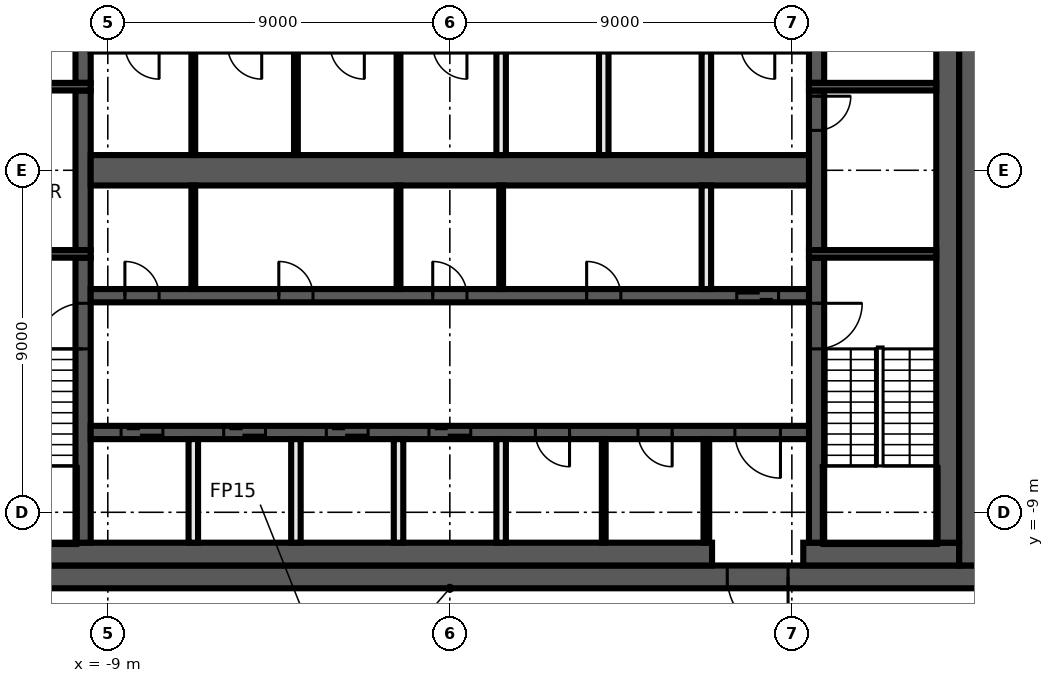
"""IFC4 building model, lengths in metres.
Left out: names, types, materials, properties, quantities, classifications, styles, units other than length and angle.
Written with IfcOpenShell. Run it as: python <this file> out.ifc"""

import sys

from ifc_helpers import new_model, si_unit, direction, frame, frame_2d, origin, place, context, subcontext, project, spatial, rectangle, extrude, element, fill, save


model = new_model("IFC4")
c1 = context("Model", 3, precision=1e-05, world=origin(), true_north=direction((0.0, 1.0)))
c2 = subcontext(c1, "Body", "Model", "MODEL_VIEW")
j1 = project(units=[si_unit("LENGTHUNIT", "METRE"), si_unit("PLANEANGLEUNIT", "RADIAN")], contexts=[c1])
p1 = place(None, origin())
s1 = spatial("IfcSite", under=j1, at=p1, CompositionType="ELEMENT")
p2 = place(p1, origin())
s2 = spatial("IfcBuilding", under=s1, at=p2, CompositionType="ELEMENT")
p3 = place(p2, frame((0.0, 0.0, 336.2)))
s3 = spatial("IfcBuildingStorey", under=s2, at=p3, CompositionType="ELEMENT", Elevation=336.2)
p4 = place(p3, frame((14.0, -10.7, 0.0), z_axis=(0.0, 0.0, 1.0), x_axis=(-1.0, 0.0, 0.0)))
e1 = element("IfcWall", 1, at=p4, inside=s3, PredefinedType="SHEAR", context=c2, shape_type="SweptSolid", body=[
    extrude(rectangle(XDim=28.0, YDim=0.6, at=frame_2d((14.0, 0.0))), origin(), (0.0, 0.0, 1.0), 3.82),
])
p5 = place(p4, frame((5.1, 0.0, 0.0)))
e2 = element("IfcOpeningElement", 2, at=p5, cuts=e1, PredefinedType="OPENING", context=c2, shape_type="SweptSolid", body=[
    extrude(rectangle(XDim=1.6, YDim=2.1, at=frame_2d((0.8, 1.05))), frame((0.0, 0.31, 0.0), z_axis=(0.0, -1.0, 0.0), x_axis=(1.0, 0.0, 0.0)), (0.0, 0.0, 1.0), 0.62),
])
p6 = place(p3, frame((13.7, 10.4, 0.0), z_axis=(0.0, 0.0, 1.0), x_axis=(0.0, -1.0, 0.0)))
e3 = element("IfcWall", 3, at=p6, inside=s3, PredefinedType="SHEAR", context=c2, shape_type="SweptSolid", body=[
    extrude(rectangle(XDim=20.8, YDim=0.6, at=frame_2d((10.4, 0.0))), origin(), (0.0, 0.0, 1.0), 3.82),
])
p7 = place(p3, frame((13.4, -10.1, 0.0), z_axis=(0.0, 0.0, 1.0), x_axis=(-1.0, 0.0, 0.0)))
e4 = element("IfcWall", 4, at=p7, inside=s3, PredefinedType="SHEAR", context=c2, shape_type="SweptSolid", body=[
    extrude(rectangle(XDim=4.1, YDim=0.6, at=frame_2d((2.05, 0.0))), origin(), (0.0, 0.0, 1.0), 3.82),
])
p8 = place(p3, frame((6.9, -10.1, 0.0), z_axis=(0.0, 0.0, 1.0), x_axis=(-1.0, 0.0, 0.0)))
e5 = element("IfcWall", 5, at=p8, inside=s3, PredefinedType="SHEAR", context=c2, shape_type="SweptSolid", body=[
    extrude(rectangle(XDim=20.3, YDim=0.6, at=frame_2d((10.15, 0.0))), origin(), (0.0, 0.0, 1.0), 3.82),
])
p9 = place(p3, frame((13.1, 9.8, 0.0), z_axis=(0.0, 0.0, 1.0), x_axis=(0.0, -1.0, 0.0)))
e6 = element("IfcWall", 6, at=p9, inside=s3, PredefinedType="SHEAR", context=c2, shape_type="SweptSolid", body=[
    extrude(rectangle(XDim=19.6, YDim=0.6, at=frame_2d((9.8, 0.0))), origin(), (0.0, 0.0, 1.0), 3.82),
])
p10 = place(p3, frame((9.65, -2.3, 0.0), z_axis=(0.0, 0.0, 1.0), x_axis=(0.0, -1.0, 0.0)))
e7 = element("IfcWall", 7, at=p10, inside=s3, PredefinedType="SHEAR", context=c2, shape_type="SweptSolid", body=[
    extrude(rectangle(XDim=7.5, YDim=0.4, at=frame_2d((3.75, 0.0))), origin(), (0.0, 0.0, 1.0), 3.82),
])
p11 = place(p10, frame((1.2, 0.0, 0.0)))
e8 = element("IfcOpeningElement", 8, at=p11, cuts=e7, PredefinedType="OPENING", context=c2, shape_type="SweptSolid", body=[
    extrude(rectangle(XDim=1.2, YDim=2.1, at=frame_2d((0.6, 1.05))), frame((0.0, 0.21, 0.0), z_axis=(0.0, -1.0, 0.0), x_axis=(1.0, 0.0, 0.0)), (0.0, 0.0, 1.0), 0.42),
])
p12 = place(p3, frame((9.65, 2.1, 0.0), z_axis=(0.0, 0.0, 1.0), x_axis=(0.0, -1.0, 0.0)))
e9 = element("IfcWall", 9, at=p12, inside=s3, PredefinedType="SHEAR", context=c2, shape_type="SweptSolid", body=[
    extrude(rectangle(XDim=4.2, YDim=0.4, at=frame_2d((2.1, 0.0))), origin(), (0.0, 0.0, 1.0), 3.82),
])
p13 = place(p12, frame((0.15, 0.0, 0.0)))
e10 = element("IfcOpeningElement", 10, at=p13, cuts=e9, PredefinedType="OPENING", context=c2, shape_type="SweptSolid", body=[
    extrude(rectangle(XDim=0.9, YDim=2.1, at=frame_2d((0.45, 1.05))), frame((0.0, 0.21, 0.0), z_axis=(0.0, -1.0, 0.0), x_axis=(1.0, 0.0, 0.0)), (0.0, 0.0, 1.0), 0.42),
])
p14 = place(p3, frame((9.65, 9.8, 0.0), z_axis=(0.0, 0.0, 1.0), x_axis=(0.0, -1.0, 0.0)))
e11 = element("IfcWall", 11, at=p14, inside=s3, PredefinedType="SHEAR", context=c2, shape_type="SweptSolid", body=[
    extrude(rectangle(XDim=7.5, YDim=0.4, at=frame_2d((3.75, 0.0))), origin(), (0.0, 0.0, 1.0), 3.82),
])
p15 = place(p14, frame((5.1, 0.0, 0.0)))
e12 = element("IfcOpeningElement", 12, at=p15, cuts=e11, PredefinedType="OPENING", context=c2, shape_type="SweptSolid", body=[
    extrude(rectangle(XDim=1.2, YDim=2.1, at=frame_2d((0.6, 1.05))), frame((0.0, 0.21, 0.0), z_axis=(0.0, -1.0, 0.0), x_axis=(1.0, 0.0, 0.0)), (0.0, 0.0, 1.0), 0.42),
])
p16 = place(p3, frame((-9.65, -9.8, 0.0), z_axis=(0.0, 0.0, 1.0), x_axis=(0.0, 1.0, 0.0)))
e13 = element("IfcWall", 13, at=p16, inside=s3, PredefinedType="SHEAR", context=c2, shape_type="SweptSolid", body=[
    extrude(rectangle(XDim=7.5, YDim=0.4, at=frame_2d((3.75, 0.0))), origin(), (0.0, 0.0, 1.0), 3.82),
])
p17 = place(p16, frame((5.1, 0.0, 0.0)))
e14 = element("IfcOpeningElement", 14, at=p17, cuts=e13, PredefinedType="OPENING", context=c2, shape_type="SweptSolid", body=[
    extrude(rectangle(XDim=1.2, YDim=2.1, at=frame_2d((0.6, 1.05))), frame((0.0, 0.21, 0.0), z_axis=(0.0, -1.0, 0.0), x_axis=(1.0, 0.0, 0.0)), (0.0, 0.0, 1.0), 0.42),
])
p18 = place(p3, frame((-9.65, -2.1, 0.0), z_axis=(0.0, 0.0, 1.0), x_axis=(0.0, 1.0, 0.0)))
e15 = element("IfcWall", 15, at=p18, inside=s3, PredefinedType="SHEAR", context=c2, shape_type="SweptSolid", body=[
    extrude(rectangle(XDim=4.2, YDim=0.4, at=frame_2d((2.1, 0.0))), origin(), (0.0, 0.0, 1.0), 3.82),
])
p19 = place(p3, frame((-9.65, 2.3, 0.0), z_axis=(0.0, 0.0, 1.0), x_axis=(0.0, 1.0, 0.0)))
e16 = element("IfcWall", 16, at=p19, inside=s3, PredefinedType="SHEAR", context=c2, shape_type="SweptSolid", body=[
    extrude(rectangle(XDim=7.5, YDim=0.4, at=frame_2d((3.75, 0.0))), origin(), (0.0, 0.0, 1.0), 3.82),
])
p20 = place(p19, frame((1.2, 0.0, 0.0)))
e17 = element("IfcOpeningElement", 17, at=p20, cuts=e16, PredefinedType="OPENING", context=c2, shape_type="SweptSolid", body=[
    extrude(rectangle(XDim=1.2, YDim=2.1, at=frame_2d((0.6, 1.05))), frame((0.0, 0.21, 0.0), z_axis=(0.0, -1.0, 0.0), x_axis=(1.0, 0.0, 0.0)), (0.0, 0.0, 1.0), 0.42),
])
for number, where, z_axis, x_axis in (
    (18, (9.45, 2.2, 0.0), (0.0, 0.0, 1.0), (1.0, 0.0, 0.0)),
    (19, (-9.45, 2.2, 0.0), (0.0, 0.0, 1.0), (-1.0, 0.0, 0.0)),
    (20, (9.45, -2.2, 0.0), (0.0, 0.0, 1.0), (1.0, 0.0, 0.0)),
    (21, (-9.45, -2.2, 0.0), (0.0, 0.0, 1.0), (-1.0, 0.0, 0.0)),
):
    element("IfcWall", number, at=place(p3, frame(where, z_axis=z_axis, x_axis=x_axis)), inside=s3, PredefinedType="SHEAR", context=c2, shape_type="SweptSolid", body=[
        extrude(rectangle(XDim=3.35, YDim=0.2, at=frame_2d((1.675, 0.0))), origin(), (0.0, 0.0, 1.0), 3.82),
    ])
p21 = place(p3, frame((-9.45, -3.3, 0.0), z_axis=(0.0, 0.0, 1.0), x_axis=(1.0, 0.0, 0.0)))
e22 = element("IfcWall", 22, at=p21, inside=s3, PredefinedType="SHEAR", context=c2, shape_type="SweptSolid", body=[
    extrude(rectangle(XDim=18.9, YDim=0.35, at=frame_2d((9.45, 0.0))), origin(), (0.0, 0.0, 1.0), 3.82),
])
p22 = place(p21, frame((17.0, 0.0, 0.0)))
e23 = element("IfcOpeningElement", 23, at=p22, cuts=e22, PredefinedType="OPENING", context=c2, shape_type="SweptSolid", body=[
    extrude(rectangle(XDim=1.1, YDim=2.1, at=frame_2d((0.55, 1.05))), frame((0.0, 0.185, 0.0), z_axis=(0.0, -1.0, 0.0), x_axis=(1.0, 0.0, 0.0)), (0.0, 0.0, 1.0), 0.37),
])
p23 = place(p21, frame((0.9, 0.0, 0.0)))
e24 = element("IfcOpeningElement", 24, at=p23, cuts=e22, PredefinedType="OPENING", context=c2, shape_type="SweptSolid", body=[
    extrude(rectangle(XDim=0.9, YDim=2.1, at=frame_2d((0.45, 1.05))), frame((0.0, 0.185, 0.0), z_axis=(0.0, -1.0, 0.0), x_axis=(1.0, 0.0, 0.0)), (0.0, 0.0, 1.0), 0.37),
])
p24 = place(p21, frame((4.95, 0.0, 0.0)))
e25 = element("IfcOpeningElement", 25, at=p24, cuts=e22, PredefinedType="OPENING", context=c2, shape_type="SweptSolid", body=[
    extrude(rectangle(XDim=0.9, YDim=2.1, at=frame_2d((0.45, 1.05))), frame((0.0, 0.185, 0.0), z_axis=(0.0, -1.0, 0.0), x_axis=(1.0, 0.0, 0.0)), (0.0, 0.0, 1.0), 0.37),
])
p25 = place(p21, frame((9.0, 0.0, 0.0)))
e26 = element("IfcOpeningElement", 26, at=p25, cuts=e22, PredefinedType="OPENING", context=c2, shape_type="SweptSolid", body=[
    extrude(rectangle(XDim=0.9, YDim=2.1, at=frame_2d((0.45, 1.05))), frame((0.0, 0.185, 0.0), z_axis=(0.0, -1.0, 0.0), x_axis=(1.0, 0.0, 0.0)), (0.0, 0.0, 1.0), 0.37),
])
p26 = place(p21, frame((13.05, 0.0, 0.0)))
e27 = element("IfcOpeningElement", 27, at=p26, cuts=e22, PredefinedType="OPENING", context=c2, shape_type="SweptSolid", body=[
    extrude(rectangle(XDim=0.9, YDim=2.1, at=frame_2d((0.45, 1.05))), frame((0.0, 0.185, 0.0), z_axis=(0.0, -1.0, 0.0), x_axis=(1.0, 0.0, 0.0)), (0.0, 0.0, 1.0), 0.37),
])
p27 = place(p3, frame((9.45, -6.9, 0.0), z_axis=(0.0, 0.0, 1.0), x_axis=(-1.0, 0.0, 0.0)))
e28 = element("IfcWall", 28, at=p27, inside=s3, PredefinedType="SHEAR", context=c2, shape_type="SweptSolid", body=[
    extrude(rectangle(XDim=18.9, YDim=0.35, at=frame_2d((9.45, 0.0))), origin(), (0.0, 0.0, 1.0), 3.82),
])
p28 = place(p27, frame((17.0, 0.0, 0.0)))
e29 = element("IfcOpeningElement", 29, at=p28, cuts=e28, PredefinedType="OPENING", context=c2, shape_type="SweptSolid", body=[
    extrude(rectangle(XDim=1.1, YDim=2.1, at=frame_2d((0.55, 1.05))), frame((0.0, 0.185, 0.0), z_axis=(0.0, -1.0, 0.0), x_axis=(1.0, 0.0, 0.0)), (0.0, 0.0, 1.0), 0.37),
])
p29 = place(p27, frame((14.3, 0.0, 0.0)))
e30 = element("IfcOpeningElement", 30, at=p29, cuts=e28, PredefinedType="OPENING", context=c2, shape_type="SweptSolid", body=[
    extrude(rectangle(XDim=1.1, YDim=2.1, at=frame_2d((0.55, 1.05))), frame((0.0, 0.185, 0.0), z_axis=(0.0, -1.0, 0.0), x_axis=(1.0, 0.0, 0.0)), (0.0, 0.0, 1.0), 0.37),
])
p30 = place(p27, frame((11.6, 0.0, 0.0)))
e31 = element("IfcOpeningElement", 31, at=p30, cuts=e28, PredefinedType="OPENING", context=c2, shape_type="SweptSolid", body=[
    extrude(rectangle(XDim=1.1, YDim=2.1, at=frame_2d((0.55, 1.05))), frame((0.0, 0.185, 0.0), z_axis=(0.0, -1.0, 0.0), x_axis=(1.0, 0.0, 0.0)), (0.0, 0.0, 1.0), 0.37),
])
p31 = place(p27, frame((8.9, 0.0, 0.0)))
e32 = element("IfcOpeningElement", 32, at=p31, cuts=e28, PredefinedType="OPENING", context=c2, shape_type="SweptSolid", body=[
    extrude(rectangle(XDim=1.1, YDim=2.1, at=frame_2d((0.55, 1.05))), frame((0.0, 0.185, 0.0), z_axis=(0.0, -1.0, 0.0), x_axis=(1.0, 0.0, 0.0)), (0.0, 0.0, 1.0), 0.37),
])
p32 = place(p27, frame((0.75, 0.0, 0.0)))
e33 = element("IfcOpeningElement", 33, at=p32, cuts=e28, PredefinedType="OPENING", context=c2, shape_type="SweptSolid", body=[
    extrude(rectangle(XDim=1.2, YDim=2.1, at=frame_2d((0.6, 1.05))), frame((0.0, 0.185, 0.0), z_axis=(0.0, -1.0, 0.0), x_axis=(1.0, 0.0, 0.0)), (0.0, 0.0, 1.0), 0.37),
])
p33 = place(p27, frame((6.3, 0.0, 0.0)))
e34 = element("IfcOpeningElement", 34, at=p33, cuts=e28, PredefinedType="OPENING", context=c2, shape_type="SweptSolid", body=[
    extrude(rectangle(XDim=0.9, YDim=2.1, at=frame_2d((0.45, 1.05))), frame((0.0, 0.185, 0.0), z_axis=(0.0, -1.0, 0.0), x_axis=(1.0, 0.0, 0.0)), (0.0, 0.0, 1.0), 0.37),
])
p34 = place(p27, frame((3.6, 0.0, 0.0)))
e35 = element("IfcOpeningElement", 35, at=p34, cuts=e28, PredefinedType="OPENING", context=c2, shape_type="SweptSolid", body=[
    extrude(rectangle(XDim=0.9, YDim=2.1, at=frame_2d((0.45, 1.05))), frame((0.0, 0.185, 0.0), z_axis=(0.0, -1.0, 0.0), x_axis=(1.0, 0.0, 0.0)), (0.0, 0.0, 1.0), 0.37),
])
p35 = place(p3, frame((-9.45, 0.0, 0.0), z_axis=(0.0, 0.0, 1.0), x_axis=(1.0, 0.0, 0.0)))
e36 = element("IfcWall", 36, at=p35, inside=s3, PredefinedType="SHEAR", context=c2, shape_type="SweptSolid", body=[
    extrude(rectangle(XDim=18.9, YDim=0.8, at=frame_2d((9.45, 0.0))), origin(), (0.0, 0.0, 1.0), 3.82),
])
p36 = place(p3, frame((6.75, -9.8, 0.0), z_axis=(0.0, 0.0, 1.0), x_axis=(0.0, 1.0, 0.0)))
e37 = element("IfcWall", 37, at=p36, inside=s3, PredefinedType="PARTITIONING", context=c2, shape_type="SweptSolid", body=[
    extrude(rectangle(XDim=2.725, YDim=0.15, at=frame_2d((1.363, 0.0))), origin(), (0.0, 0.0, 1.0), 3.82),
])
for number, where, z_axis, x_axis in (
    (38, (6.75, -3.125, 0.0), (0.0, 0.0, 1.0), (0.0, 1.0, 0.0)),
    (39, (6.75, 0.4, 0.0), (0.0, 0.0, 1.0), (0.0, 1.0, 0.0)),
):
    element("IfcWall", number, at=place(p3, frame(where, z_axis=z_axis, x_axis=x_axis)), inside=s3, PredefinedType="SOLIDWALL", context=c2, shape_type="SweptSolid", body=[
        extrude(rectangle(XDim=2.725, YDim=0.25, at=frame_2d((1.363, 0.0))), origin(), (0.0, 0.0, 1.0), 3.82),
    ])
p37 = place(p3, frame((4.05, -9.8, 0.0), z_axis=(0.0, 0.0, 1.0), x_axis=(0.0, 1.0, 0.0)))
e40 = element("IfcWall", 40, at=p37, inside=s3, PredefinedType="PARTITIONING", context=c2, shape_type="SweptSolid", body=[
    extrude(rectangle(XDim=2.725, YDim=0.1, at=frame_2d((1.363, 0.0))), origin(), (0.0, 0.0, 1.0), 3.82),
])
p38 = place(p3, frame((4.05, 0.4, 0.0), z_axis=(0.0, 0.0, 1.0), x_axis=(0.0, 1.0, 0.0)))
e41 = element("IfcWall", 41, at=p38, inside=s3, PredefinedType="SOLIDWALL", context=c2, shape_type="SweptSolid", body=[
    extrude(rectangle(XDim=2.725, YDim=0.25, at=frame_2d((1.363, 0.0))), origin(), (0.0, 0.0, 1.0), 3.82),
])
p39 = place(p3, frame((1.35, -3.125, 0.0), z_axis=(0.0, 0.0, 1.0), x_axis=(0.0, 1.0, 0.0)))
e42 = element("IfcWall", 42, at=p39, inside=s3, PredefinedType="PARTITIONING", context=c2, shape_type="SweptSolid", body=[
    extrude(rectangle(XDim=2.725, YDim=0.1, at=frame_2d((1.363, 0.0))), origin(), (0.0, 0.0, 1.0), 3.82),
])
for number, where, z_axis, x_axis in (
    (43, (1.35, -9.8, 0.0), (0.0, 0.0, 1.0), (0.0, 1.0, 0.0)),
    (44, (1.35, 0.4, 0.0), (0.0, 0.0, 1.0), (0.0, 1.0, 0.0)),
):
    element("IfcWall", number, at=place(p3, frame(where, z_axis=z_axis, x_axis=x_axis)), inside=s3, PredefinedType="SOLIDWALL", context=c2, shape_type="SweptSolid", body=[
        extrude(rectangle(XDim=2.725, YDim=0.25, at=frame_2d((1.363, 0.0))), origin(), (0.0, 0.0, 1.0), 3.82),
    ])
for number, where, z_axis, x_axis in (
    (45, (-1.35, -3.125, 0.0), (0.0, 0.0, 1.0), (0.0, 1.0, 0.0)),
    (46, (-1.35, 0.4, 0.0), (0.0, 0.0, 1.0), (0.0, 1.0, 0.0)),
):
    element("IfcWall", number, at=place(p3, frame(where, z_axis=z_axis, x_axis=x_axis)), inside=s3, PredefinedType="PARTITIONING", context=c2, shape_type="SweptSolid", body=[
        extrude(rectangle(XDim=2.725, YDim=0.1, at=frame_2d((1.363, 0.0))), origin(), (0.0, 0.0, 1.0), 3.82),
    ])
p40 = place(p3, frame((-1.35, -9.8, 0.0), z_axis=(0.0, 0.0, 1.0), x_axis=(0.0, 1.0, 0.0)))
e47 = element("IfcWall", 47, at=p40, inside=s3, PredefinedType="SOLIDWALL", context=c2, shape_type="SweptSolid", body=[
    extrude(rectangle(XDim=2.725, YDim=0.25, at=frame_2d((1.363, 0.0))), origin(), (0.0, 0.0, 1.0), 3.82),
])
p41 = place(p3, frame((-4.05, 0.4, 0.0), z_axis=(0.0, 0.0, 1.0), x_axis=(0.0, 1.0, 0.0)))
e48 = element("IfcWall", 48, at=p41, inside=s3, PredefinedType="PARTITIONING", context=c2, shape_type="SweptSolid", body=[
    extrude(rectangle(XDim=2.725, YDim=0.1, at=frame_2d((1.363, 0.0))), origin(), (0.0, 0.0, 1.0), 3.82),
])
p42 = place(p3, frame((-4.05, -9.8, 0.0), z_axis=(0.0, 0.0, 1.0), x_axis=(0.0, 1.0, 0.0)))
e49 = element("IfcWall", 49, at=p42, inside=s3, PredefinedType="SOLIDWALL", context=c2, shape_type="SweptSolid", body=[
    extrude(rectangle(XDim=2.725, YDim=0.25, at=frame_2d((1.363, 0.0))), origin(), (0.0, 0.0, 1.0), 3.82),
])
for number, where, z_axis, x_axis in (
    (50, (-6.75, -3.125, 0.0), (0.0, 0.0, 1.0), (0.0, 1.0, 0.0)),
    (51, (-6.75, 0.4, 0.0), (0.0, 0.0, 1.0), (0.0, 1.0, 0.0)),
):
    element("IfcWall", number, at=place(p3, frame(where, z_axis=z_axis, x_axis=x_axis)), inside=s3, PredefinedType="PARTITIONING", context=c2, shape_type="SweptSolid", body=[
        extrude(rectangle(XDim=2.725, YDim=0.1, at=frame_2d((1.363, 0.0))), origin(), (0.0, 0.0, 1.0), 3.82),
    ])
p43 = place(p3, frame((-6.75, -9.8, 0.0), z_axis=(0.0, 0.0, 1.0), x_axis=(0.0, 1.0, 0.0)))
e52 = element("IfcWall", 52, at=p43, inside=s3, PredefinedType="SOLIDWALL", context=c2, shape_type="SweptSolid", body=[
    extrude(rectangle(XDim=2.725, YDim=0.25, at=frame_2d((1.363, 0.0))), origin(), (0.0, 0.0, 1.0), 3.82),
])
p44 = place(p13, origin())
e53 = element("IfcDoor", 53, at=p44, inside=s3, OperationType="SINGLE_SWING_RIGHT", PredefinedType="DOOR", context=c2, shape_type="SweptSolid", body=[
    extrude(rectangle(XDim=0.9, YDim=2.1, at=frame_2d((0.45, 1.05))), frame((0.0, 0.025, 0.0), z_axis=(0.0, -1.0, 0.0), x_axis=(1.0, 0.0, 0.0)), (0.0, 0.0, 1.0), 0.05),
])
fill(e10, e53)
p45 = place(p22, origin())
e54 = element("IfcDoor", 54, at=p45, inside=s3, OperationType="DOUBLE_DOOR_SLIDING", PredefinedType="DOOR", context=c2, shape_type="SweptSolid", body=[
    extrude(rectangle(XDim=1.1, YDim=2.1, at=frame_2d((0.55, 1.05))), frame((0.0, 0.025, 0.0), z_axis=(0.0, -1.0, 0.0), x_axis=(1.0, 0.0, 0.0)), (0.0, 0.0, 1.0), 0.05),
])
fill(e23, e54)
p46 = place(p28, origin())
e55 = element("IfcDoor", 55, at=p46, inside=s3, OperationType="DOUBLE_DOOR_SLIDING", PredefinedType="DOOR", context=c2, shape_type="SweptSolid", body=[
    extrude(rectangle(XDim=1.1, YDim=2.1, at=frame_2d((0.55, 1.05))), frame((0.0, 0.025, 0.0), z_axis=(0.0, -1.0, 0.0), x_axis=(1.0, 0.0, 0.0)), (0.0, 0.0, 1.0), 0.05),
])
fill(e29, e55)
p47 = place(p29, origin())
e56 = element("IfcDoor", 56, at=p47, inside=s3, OperationType="DOUBLE_DOOR_SLIDING", PredefinedType="DOOR", context=c2, shape_type="SweptSolid", body=[
    extrude(rectangle(XDim=1.1, YDim=2.1, at=frame_2d((0.55, 1.05))), frame((0.0, 0.025, 0.0), z_axis=(0.0, -1.0, 0.0), x_axis=(1.0, 0.0, 0.0)), (0.0, 0.0, 1.0), 0.05),
])
fill(e30, e56)
p48 = place(p30, origin())
e57 = element("IfcDoor", 57, at=p48, inside=s3, OperationType="DOUBLE_DOOR_SLIDING", PredefinedType="DOOR", context=c2, shape_type="SweptSolid", body=[
    extrude(rectangle(XDim=1.1, YDim=2.1, at=frame_2d((0.55, 1.05))), frame((0.0, 0.025, 0.0), z_axis=(0.0, -1.0, 0.0), x_axis=(1.0, 0.0, 0.0)), (0.0, 0.0, 1.0), 0.05),
])
fill(e31, e57)
p49 = place(p31, origin())
e58 = element("IfcDoor", 58, at=p49, inside=s3, OperationType="DOUBLE_DOOR_SLIDING", PredefinedType="DOOR", context=c2, shape_type="SweptSolid", body=[
    extrude(rectangle(XDim=1.1, YDim=2.1, at=frame_2d((0.55, 1.05))), frame((0.0, 0.025, 0.0), z_axis=(0.0, -1.0, 0.0), x_axis=(1.0, 0.0, 0.0)), (0.0, 0.0, 1.0), 0.05),
])
fill(e32, e58)
p50 = place(p5, origin())
e59 = element("IfcDoor", 59, at=p50, inside=s3, OperationType="DOUBLE_DOOR_SINGLE_SWING", PredefinedType="DOOR", context=c2, shape_type="SweptSolid", body=[
    extrude(rectangle(XDim=1.6, YDim=2.1, at=frame_2d((0.8, 1.05))), frame((0.0, 0.025, 0.0), z_axis=(0.0, -1.0, 0.0), x_axis=(1.0, 0.0, 0.0)), (0.0, 0.0, 1.0), 0.05),
])
fill(e2, e59)
p51 = place(p32, origin())
e60 = element("IfcDoor", 60, at=p51, inside=s3, OperationType="SINGLE_SWING_LEFT", PredefinedType="DOOR", context=c2, shape_type="SweptSolid", body=[
    extrude(rectangle(XDim=1.2, YDim=2.1, at=frame_2d((0.6, 1.05))), frame((0.0, 0.025, 0.0), z_axis=(0.0, -1.0, 0.0), x_axis=(1.0, 0.0, 0.0)), (0.0, 0.0, 1.0), 0.05),
])
fill(e33, e60)
p52 = place(p23, origin())
e61 = element("IfcDoor", 61, at=p52, inside=s3, OperationType="SINGLE_SWING_RIGHT", PredefinedType="DOOR", context=c2, shape_type="SweptSolid", body=[
    extrude(rectangle(XDim=0.9, YDim=2.1, at=frame_2d((0.45, 1.05))), frame((0.0, 0.025, 0.0), z_axis=(0.0, -1.0, 0.0), x_axis=(1.0, 0.0, 0.0)), (0.0, 0.0, 1.0), 0.05),
])
fill(e24, e61)
p53 = place(p24, origin())
e62 = element("IfcDoor", 62, at=p53, inside=s3, OperationType="SINGLE_SWING_LEFT", PredefinedType="DOOR", context=c2, shape_type="SweptSolid", body=[
    extrude(rectangle(XDim=0.9, YDim=2.1, at=frame_2d((0.45, 1.05))), frame((0.0, 0.025, 0.0), z_axis=(0.0, -1.0, 0.0), x_axis=(1.0, 0.0, 0.0)), (0.0, 0.0, 1.0), 0.05),
])
fill(e25, e62)
p54 = place(p25, origin())
e63 = element("IfcDoor", 63, at=p54, inside=s3, OperationType="SINGLE_SWING_RIGHT", PredefinedType="DOOR", context=c2, shape_type="SweptSolid", body=[
    extrude(rectangle(XDim=0.9, YDim=2.1, at=frame_2d((0.45, 1.05))), frame((0.0, 0.025, 0.0), z_axis=(0.0, -1.0, 0.0), x_axis=(1.0, 0.0, 0.0)), (0.0, 0.0, 1.0), 0.05),
])
fill(e26, e63)
p55 = place(p26, origin())
e64 = element("IfcDoor", 64, at=p55, inside=s3, OperationType="SINGLE_SWING_LEFT", PredefinedType="DOOR", context=c2, shape_type="SweptSolid", body=[
    extrude(rectangle(XDim=0.9, YDim=2.1, at=frame_2d((0.45, 1.05))), frame((0.0, 0.025, 0.0), z_axis=(0.0, -1.0, 0.0), x_axis=(1.0, 0.0, 0.0)), (0.0, 0.0, 1.0), 0.05),
])
fill(e27, e64)
p56 = place(p33, origin())
e65 = element("IfcDoor", 65, at=p56, inside=s3, OperationType="SINGLE_SWING_RIGHT", PredefinedType="DOOR", context=c2, shape_type="SweptSolid", body=[
    extrude(rectangle(XDim=0.9, YDim=2.1, at=frame_2d((0.45, 1.05))), frame((0.0, 0.025, 0.0), z_axis=(0.0, -1.0, 0.0), x_axis=(1.0, 0.0, 0.0)), (0.0, 0.0, 1.0), 0.05),
])
fill(e34, e65)
p57 = place(p34, origin())
e66 = element("IfcDoor", 66, at=p57, inside=s3, OperationType="SINGLE_SWING_LEFT", PredefinedType="DOOR", context=c2, shape_type="SweptSolid", body=[
    extrude(rectangle(XDim=0.9, YDim=2.1, at=frame_2d((0.45, 1.05))), frame((0.0, 0.025, 0.0), z_axis=(0.0, -1.0, 0.0), x_axis=(1.0, 0.0, 0.0)), (0.0, 0.0, 1.0), 0.05),
])
fill(e35, e66)
p58 = place(p11, origin())
e67 = element("IfcDoor", 67, at=p58, inside=s3, OperationType="SINGLE_SWING_RIGHT", PredefinedType="DOOR", context=c2, shape_type="SweptSolid", body=[
    extrude(rectangle(XDim=1.2, YDim=2.1, at=frame_2d((0.6, 1.05))), frame((0.0, 0.025, 0.0), z_axis=(0.0, -1.0, 0.0), x_axis=(1.0, 0.0, 0.0)), (0.0, 0.0, 1.0), 0.05),
])
fill(e8, e67)
p59 = place(p17, origin())
e68 = element("IfcDoor", 68, at=p59, inside=s3, OperationType="SINGLE_SWING_LEFT", PredefinedType="DOOR", context=c2, shape_type="SweptSolid", body=[
    extrude(rectangle(XDim=1.2, YDim=2.1, at=frame_2d((0.6, 1.05))), frame((0.0, 0.025, 0.0), z_axis=(0.0, -1.0, 0.0), x_axis=(1.0, 0.0, 0.0)), (0.0, 0.0, 1.0), 0.05),
])
fill(e14, e68)
save(model, sys.argv[1])
